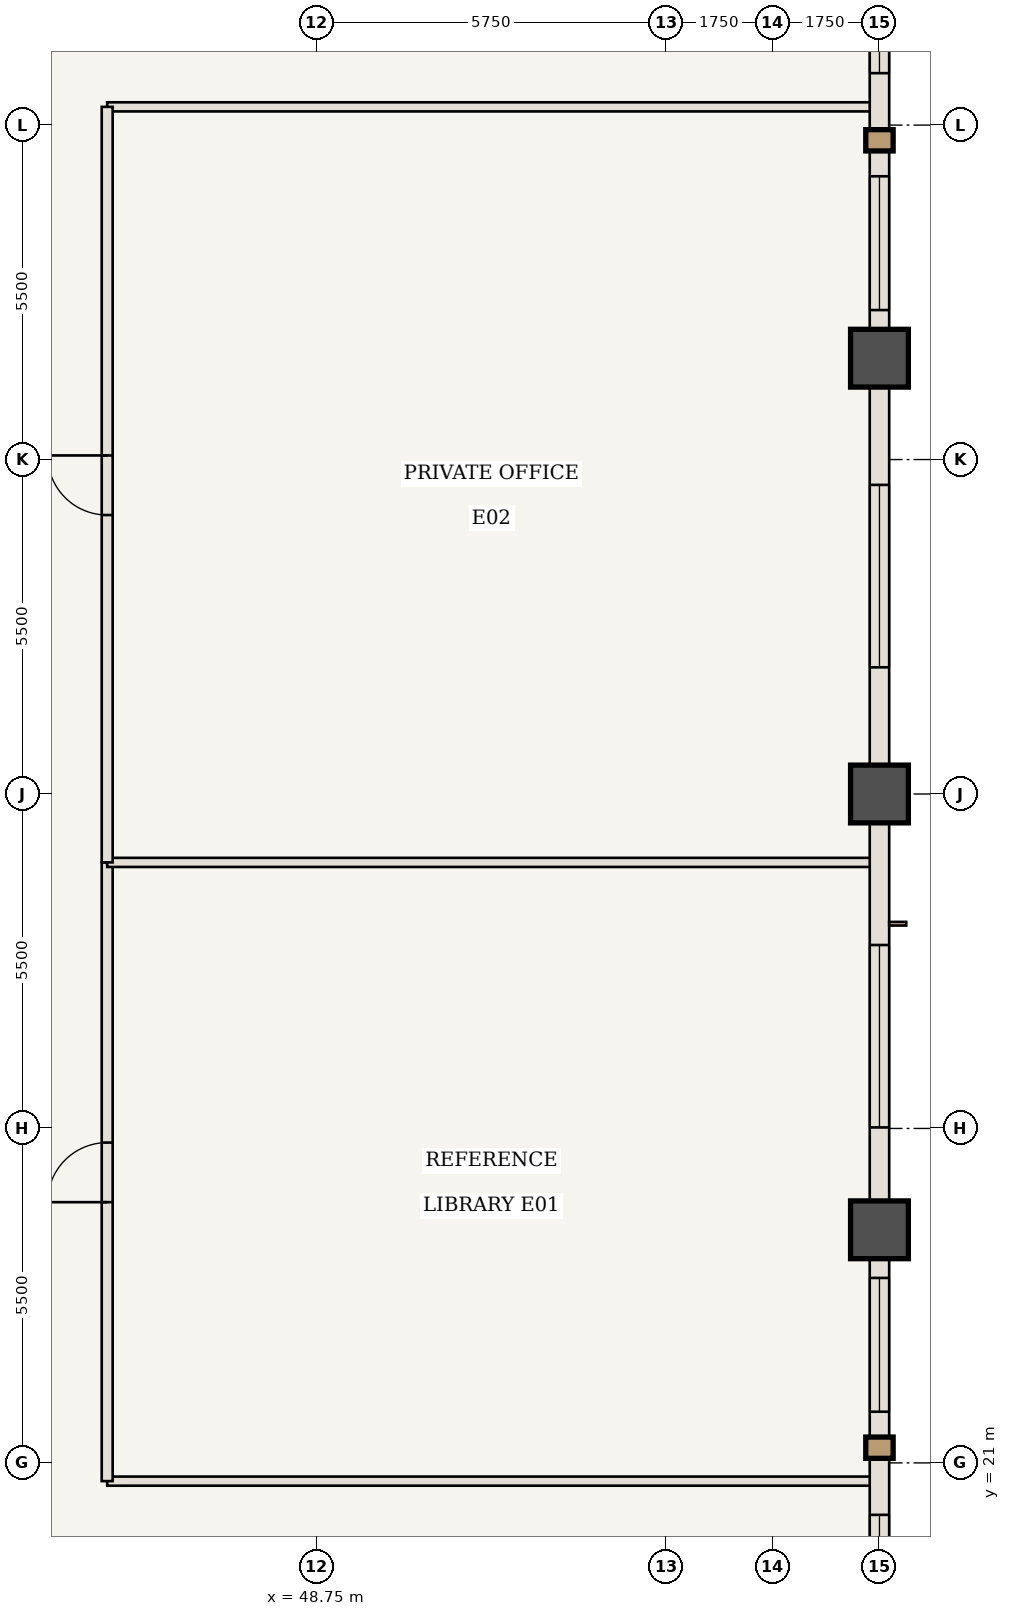
"""IFC4 building model, lengths in metres.
Left out: names, types, materials, properties, quantities, classifications, styles, units other than length and angle.
Written with IfcOpenShell. Run it as: python <this file> out.ifc"""

import sys

from ifc_helpers import new_model, si_unit, direction, frame, frame_2d, origin, origin_2d, place, context, subcontext, project, spatial, rectangle, extrude, element, fill, save


model = new_model("IFC4")
c1 = context("Model", 3, precision=1e-05, world=origin(), true_north=direction((0.0, 1.0)))
c2 = subcontext(c1, "Body", "Model", "MODEL_VIEW")
j1 = project(units=[si_unit("LENGTHUNIT", "METRE"), si_unit("PLANEANGLEUNIT", "RADIAN")], contexts=[c1])
p1 = place(None, origin())
s1 = spatial("IfcSite", under=j1, at=p1, CompositionType="ELEMENT")
p2 = place(p1, origin())
s2 = spatial("IfcBuilding", under=s1, at=p2, CompositionType="ELEMENT")
p3 = place(p2, frame((0.0, 0.0, 141.4)))
s3 = spatial("IfcBuildingStorey", under=s2, at=p3, CompositionType="ELEMENT", Elevation=141.4)
for number, where, z_axis, x_axis in (
    (1, (58.0, 24.833, 0.0), (0.0, 0.0, 1.0), (1.0, 0.0, 0.0)),
    (2, (58.0, 32.0, 0.0), (0.0, 0.0, 1.0), (1.0, 0.0, 0.0)),
    (3, (58.0, 39.167, 0.0), (0.0, 0.0, 1.0), (1.0, 0.0, 0.0)),
):
    element("IfcColumn", number, at=place(p3, frame(where, z_axis=z_axis, x_axis=x_axis)), inside=s3, PredefinedType="COLUMN", context=c2, shape_type="SweptSolid", body=[
        extrude(rectangle(XDim=0.95, YDim=0.95, at=origin_2d()), origin(), (0.0, 0.0, 1.0), 3.85),
    ])
for number, where, z_axis, x_axis in (
    (4, (45.3, 20.7, 0.0), (0.0, 0.0, 1.0), (1.0, 0.0, 0.0)),
    (5, (45.3, 43.3, 0.0), (0.0, 0.0, 1.0), (1.0, 0.0, 0.0)),
):
    element("IfcWall", number, at=place(p3, frame(where, z_axis=z_axis, x_axis=x_axis)), inside=s3, PredefinedType="STANDARD", context=c2, shape_type="SweptSolid", body=[
        extrude(rectangle(XDim=12.64, YDim=0.15, at=frame_2d((6.32, 0.0))), origin(), (0.0, 0.0, 1.0), 3.065),
    ])
p4 = place(p3, frame((45.3, 20.7, 0.0), z_axis=(0.0, 0.0, 1.0), x_axis=(0.0, 1.0, 0.0)))
e6 = element("IfcWall", 6, at=p4, inside=s3, PredefinedType="STANDARD", context=c2, shape_type="SweptSolid", body=[
    extrude(rectangle(XDim=10.175, YDim=0.18, at=frame_2d((5.087, 0.0))), origin(), (0.0, 0.0, 1.0), 3.685),
])
p5 = place(p4, frame((4.587, 0.0, 0.0)))
e7 = element("IfcOpeningElement", 7, at=p5, cuts=e6, PredefinedType="OPENING", context=c2, shape_type="SweptSolid", body=[
    extrude(rectangle(XDim=0.98, YDim=2.2, at=frame_2d((0.49, 1.1))), frame((0.0, 0.1, 0.0), z_axis=(0.0, -1.0, 0.0), x_axis=(1.0, 0.0, 0.0)), (0.0, 0.0, 1.0), 0.2),
])
p6 = place(p3, frame((45.3, 30.875, 0.0), z_axis=(0.0, 0.0, 1.0), x_axis=(1.0, 0.0, 0.0)))
e8 = element("IfcWall", 8, at=p6, inside=s3, PredefinedType="STANDARD", context=c2, shape_type="SweptSolid", body=[
    extrude(rectangle(XDim=12.64, YDim=0.15, at=frame_2d((6.32, 0.0))), origin(), (0.0, 0.0, 1.0), 3.685),
])
p7 = place(p3, frame((45.3, 30.875, 0.0), z_axis=(0.0, 0.0, 1.0), x_axis=(0.0, 1.0, 0.0)))
e9 = element("IfcWall", 9, at=p7, inside=s3, PredefinedType="STANDARD", context=c2, shape_type="SweptSolid", body=[
    extrude(rectangle(XDim=12.425, YDim=0.18, at=frame_2d((6.212, 0.0))), origin(), (0.0, 0.0, 1.0), 3.685),
])
p8 = place(p7, frame((5.712, 0.0, 0.0)))
e10 = element("IfcOpeningElement", 10, at=p8, cuts=e9, PredefinedType="OPENING", context=c2, shape_type="SweptSolid", body=[
    extrude(rectangle(XDim=0.98, YDim=2.2, at=frame_2d((0.49, 1.1))), frame((0.0, 0.1, 0.0), z_axis=(0.0, -1.0, 0.0), x_axis=(1.0, 0.0, 0.0)), (0.0, 0.0, 1.0), 0.2),
])
p9 = place(p3, frame((58.0, 24.833, 0.0), z_axis=(0.0, 0.0, 1.0), x_axis=(0.0, -1.0, 0.0)))
e11 = element("IfcWall", 11, at=p9, inside=s3, PredefinedType="USERDEFINED", context=c2, shape_type="SweptSolid", body=[
    extrude(rectangle(XDim=7.167, YDim=0.32, at=frame_2d((3.583, 0.0))), origin(), (0.0, 0.0, 1.0), 2.885),
])
p10 = place(p9, frame((0.792, 0.0, 0.85)))
e12 = element("IfcOpeningElement", 12, at=p10, cuts=e11, PredefinedType="OPENING", context=c2, shape_type="SweptSolid", body=[
    extrude(rectangle(XDim=2.2, YDim=1.835, at=frame_2d((1.1, 0.917))), frame((0.0, 0.17, 0.0), z_axis=(0.0, -1.0, 0.0), x_axis=(1.0, 0.0, 0.0)), (0.0, 0.0, 1.0), 0.34),
])
p11 = place(p9, frame((4.688, 0.0, 0.85)))
e13 = element("IfcOpeningElement", 13, at=p11, cuts=e11, PredefinedType="OPENING", context=c2, shape_type="SweptSolid", body=[
    extrude(rectangle(XDim=1.6, YDim=1.835, at=frame_2d((0.8, 0.917))), frame((0.0, 0.17, 0.0), z_axis=(0.0, -1.0, 0.0), x_axis=(1.0, 0.0, 0.0)), (0.0, 0.0, 1.0), 0.34),
])
p12 = place(p3, frame((58.0, 32.0, 0.0), z_axis=(0.0, 0.0, 1.0), x_axis=(0.0, -1.0, 0.0)))
e14 = element("IfcWall", 14, at=p12, inside=s3, PredefinedType="USERDEFINED", context=c2, shape_type="SweptSolid", body=[
    extrude(rectangle(XDim=7.167, YDim=0.32, at=frame_2d((3.583, 0.0))), origin(), (0.0, 0.0, 1.0), 2.885),
])
p13 = place(p12, frame((2.483, 0.0, 0.85)))
e15 = element("IfcOpeningElement", 15, at=p13, cuts=e14, PredefinedType="OPENING", context=c2, shape_type="SweptSolid", body=[
    extrude(rectangle(XDim=3.0, YDim=1.835, at=frame_2d((1.5, 0.917))), frame((0.0, 0.17, 0.0), z_axis=(0.0, -1.0, 0.0), x_axis=(1.0, 0.0, 0.0)), (0.0, 0.0, 1.0), 0.34),
])
p14 = place(p3, frame((58.0, 39.167, 0.0), z_axis=(0.0, 0.0, 1.0), x_axis=(0.0, -1.0, 0.0)))
e16 = element("IfcWall", 16, at=p14, inside=s3, PredefinedType="USERDEFINED", context=c2, shape_type="SweptSolid", body=[
    extrude(rectangle(XDim=7.167, YDim=0.32, at=frame_2d((3.583, 0.0))), origin(), (0.0, 0.0, 1.0), 2.885),
])
p15 = place(p14, frame((2.083, 0.0, 0.85)))
e17 = element("IfcOpeningElement", 17, at=p15, cuts=e16, PredefinedType="OPENING", context=c2, shape_type="SweptSolid", body=[
    extrude(rectangle(XDim=3.0, YDim=1.835, at=frame_2d((1.5, 0.917))), frame((0.0, 0.17, 0.0), z_axis=(0.0, -1.0, 0.0), x_axis=(1.0, 0.0, 0.0)), (0.0, 0.0, 1.0), 0.34),
])
p16 = place(p3, frame((58.0, 46.333, 0.0), z_axis=(0.0, 0.0, 1.0), x_axis=(0.0, -1.0, 0.0)))
e18 = element("IfcWall", 18, at=p16, inside=s3, PredefinedType="USERDEFINED", context=c2, shape_type="SweptSolid", body=[
    extrude(rectangle(XDim=7.167, YDim=0.32, at=frame_2d((3.583, 0.0))), origin(), (0.0, 0.0, 1.0), 2.885),
])
p17 = place(p16, frame((0.879, 0.0, 0.85)))
e19 = element("IfcOpeningElement", 19, at=p17, cuts=e18, PredefinedType="OPENING", context=c2, shape_type="SweptSolid", body=[
    extrude(rectangle(XDim=1.6, YDim=1.835, at=frame_2d((0.8, 0.917))), frame((0.0, 0.17, 0.0), z_axis=(0.0, -1.0, 0.0), x_axis=(1.0, 0.0, 0.0)), (0.0, 0.0, 1.0), 0.34),
])
p18 = place(p16, frame((4.175, 0.0, 0.85)))
e20 = element("IfcOpeningElement", 20, at=p18, cuts=e18, PredefinedType="OPENING", context=c2, shape_type="SweptSolid", body=[
    extrude(rectangle(XDim=2.2, YDim=1.835, at=frame_2d((1.1, 0.917))), frame((0.0, 0.17, 0.0), z_axis=(0.0, -1.0, 0.0), x_axis=(1.0, 0.0, 0.0)), (0.0, 0.0, 1.0), 0.34),
])
p19 = place(p5, origin())
e21 = element("IfcDoor", 21, at=p19, inside=s3, OperationType="SINGLE_SWING_LEFT", PredefinedType="DOOR", context=c2, shape_type="SweptSolid", body=[
    extrude(rectangle(XDim=0.98, YDim=2.2, at=frame_2d((0.49, 1.1))), frame((0.0, 0.025, 0.0), z_axis=(0.0, -1.0, 0.0), x_axis=(1.0, 0.0, 0.0)), (0.0, 0.0, 1.0), 0.05),
])
fill(e7, e21)
p20 = place(p8, origin())
e22 = element("IfcDoor", 22, at=p20, inside=s3, OperationType="SINGLE_SWING_RIGHT", PredefinedType="DOOR", context=c2, shape_type="SweptSolid", body=[
    extrude(rectangle(XDim=0.98, YDim=2.2, at=frame_2d((0.49, 1.1))), frame((0.0, 0.025, 0.0), z_axis=(0.0, -1.0, 0.0), x_axis=(1.0, 0.0, 0.0)), (0.0, 0.0, 1.0), 0.05),
])
fill(e10, e22)
p21 = place(p10, origin())
e23 = element("IfcWindow", 23, at=p21, inside=s3, PartitioningType="SINGLE_PANEL", PredefinedType="WINDOW", context=c2, shape_type="SweptSolid", body=[
    extrude(rectangle(XDim=2.2, YDim=1.835, at=frame_2d((1.1, 0.917))), frame((0.0, 0.03, 0.0), z_axis=(0.0, -1.0, 0.0), x_axis=(1.0, 0.0, 0.0)), (0.0, 0.0, 1.0), 0.06),
])
fill(e12, e23)
p22 = place(p11, origin())
e24 = element("IfcWindow", 24, at=p22, inside=s3, PartitioningType="SINGLE_PANEL", PredefinedType="WINDOW", context=c2, shape_type="SweptSolid", body=[
    extrude(rectangle(XDim=1.6, YDim=1.835, at=frame_2d((0.8, 0.917))), frame((0.0, 0.03, 0.0), z_axis=(0.0, -1.0, 0.0), x_axis=(1.0, 0.0, 0.0)), (0.0, 0.0, 1.0), 0.06),
])
fill(e13, e24)
p23 = place(p13, origin())
e25 = element("IfcWindow", 25, at=p23, inside=s3, PartitioningType="SINGLE_PANEL", PredefinedType="WINDOW", context=c2, shape_type="SweptSolid", body=[
    extrude(rectangle(XDim=3.0, YDim=1.835, at=frame_2d((1.5, 0.917))), frame((0.0, 0.03, 0.0), z_axis=(0.0, -1.0, 0.0), x_axis=(1.0, 0.0, 0.0)), (0.0, 0.0, 1.0), 0.06),
])
fill(e15, e25)
p24 = place(p15, origin())
e26 = element("IfcWindow", 26, at=p24, inside=s3, PartitioningType="SINGLE_PANEL", PredefinedType="WINDOW", context=c2, shape_type="SweptSolid", body=[
    extrude(rectangle(XDim=3.0, YDim=1.835, at=frame_2d((1.5, 0.917))), frame((0.0, 0.03, 0.0), z_axis=(0.0, -1.0, 0.0), x_axis=(1.0, 0.0, 0.0)), (0.0, 0.0, 1.0), 0.06),
])
fill(e17, e26)
p25 = place(p17, origin())
e27 = element("IfcWindow", 27, at=p25, inside=s3, PartitioningType="SINGLE_PANEL", PredefinedType="WINDOW", context=c2, shape_type="SweptSolid", body=[
    extrude(rectangle(XDim=1.6, YDim=1.835, at=frame_2d((0.8, 0.917))), frame((0.0, 0.03, 0.0), z_axis=(0.0, -1.0, 0.0), x_axis=(1.0, 0.0, 0.0)), (0.0, 0.0, 1.0), 0.06),
])
fill(e19, e27)
p26 = place(p18, origin())
e28 = element("IfcWindow", 28, at=p26, inside=s3, PartitioningType="SINGLE_PANEL", PredefinedType="WINDOW", context=c2, shape_type="SweptSolid", body=[
    extrude(rectangle(XDim=2.2, YDim=1.835, at=frame_2d((1.1, 0.917))), frame((0.0, 0.03, 0.0), z_axis=(0.0, -1.0, 0.0), x_axis=(1.0, 0.0, 0.0)), (0.0, 0.0, 1.0), 0.06),
])
fill(e20, e28)
save(model, sys.argv[1])
